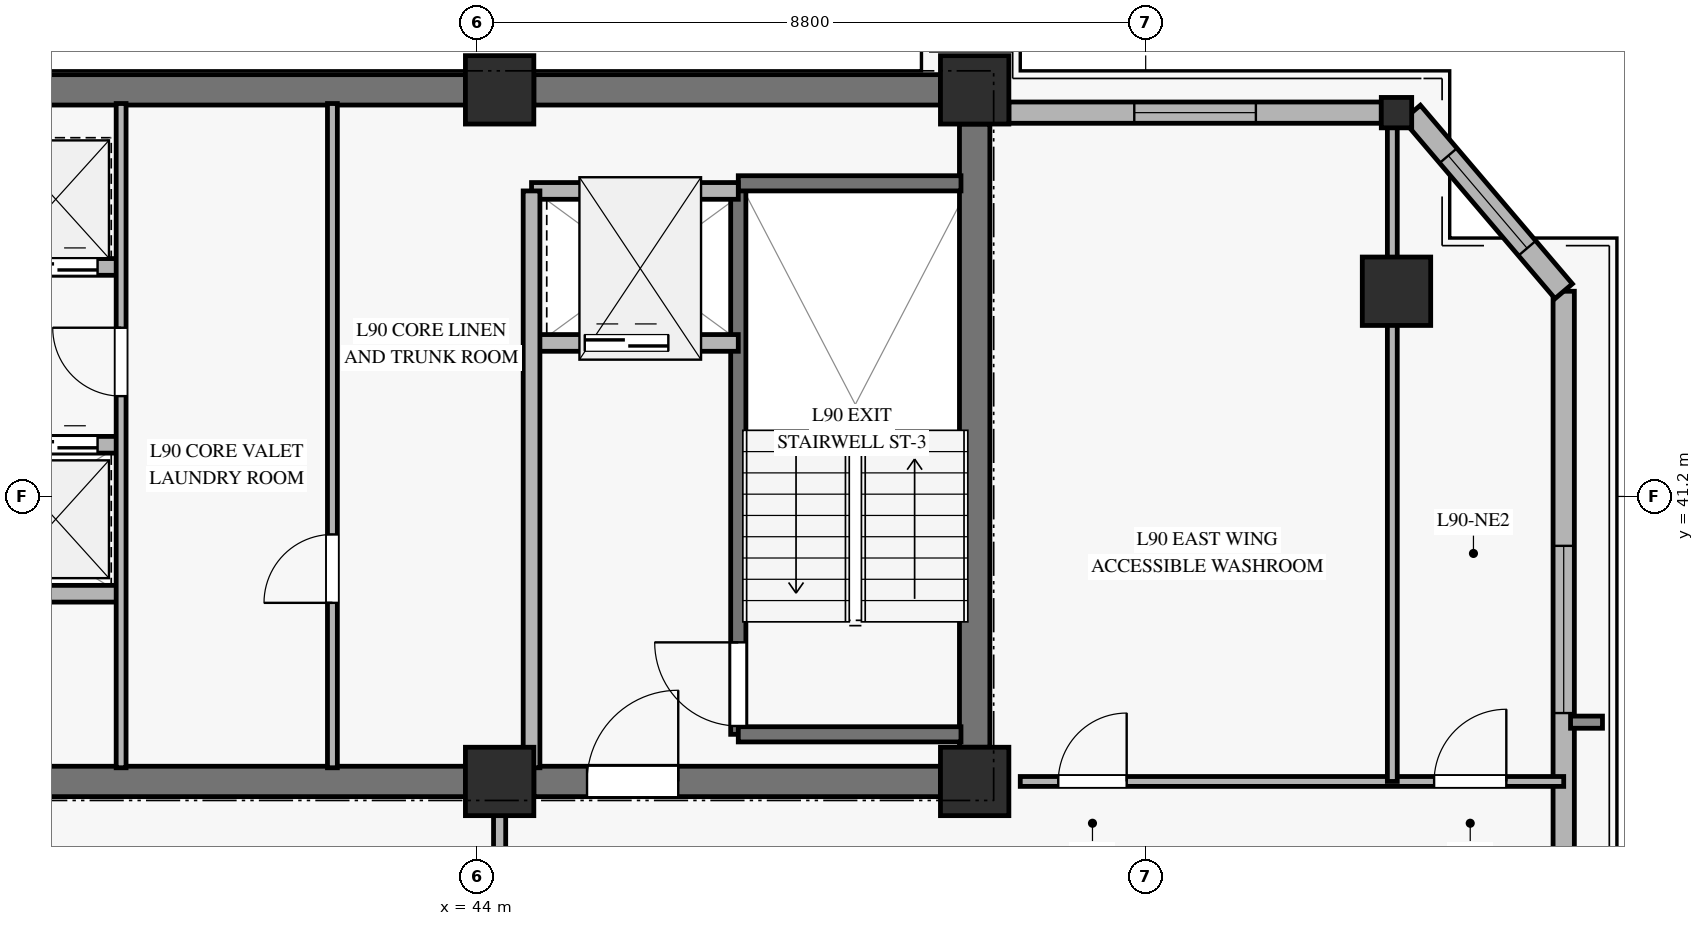
"""IFC4 building model, lengths in metres.
Left out: names, types, materials, properties, quantities, classifications, styles, units other than length and angle.
Written with IfcOpenShell. Run it as: python <this file> out.ifc"""

import sys

from ifc_helpers import new_model, si_unit, direction, frame, frame_2d, origin, origin_2d, place, context, subcontext, project, spatial, rectangle, hollow_rectangle, extrude, source, transform, mapped, element, fill, save


model = new_model("IFC4")
c1 = context("Model", 3, precision=1e-05, world=origin(), true_north=direction((0.0, 1.0)))
c2 = subcontext(c1, "Body", "Model", "MODEL_VIEW")
j1 = project(units=[si_unit("LENGTHUNIT", "METRE"), si_unit("PLANEANGLEUNIT", "RADIAN")], contexts=[c1])
p1 = place(None, origin())
s1 = spatial("IfcSite", under=j1, at=p1, CompositionType="ELEMENT")
p2 = place(p1, origin())
s2 = spatial("IfcBuilding", under=s1, at=p2, CompositionType="ELEMENT")
p3 = place(p2, frame((0.0, 0.0, 345.9)))
s3 = spatial("IfcBuildingStorey", under=s2, at=p3, CompositionType="ELEMENT", Elevation=345.9)
m1 = source(origin(), c2, "Body", "SweptSolid", [
    extrude(rectangle(XDim=0.9, YDim=0.9, at=origin_2d()), origin(), (0.0, 0.0, 1.0), 3.185),
])
for number, where, z_axis, x_axis in (
    (1, (44.3, 37.45, 0.0), (0.0, 0.0, 1.0), (1.0, 0.0, 0.0)),
    (2, (44.3, 46.55, 0.0), (0.0, 0.0, 1.0), (1.0, 0.0, 0.0)),
    (3, (50.55, 37.45, 0.0), (0.0, 0.0, 1.0), (1.0, 0.0, 0.0)),
    (4, (50.55, 46.55, 0.0), (0.0, 0.0, 1.0), (1.0, 0.0, 0.0)),
):
    element("IfcColumn", number, at=place(p3, frame(where, z_axis=z_axis, x_axis=x_axis)), inside=s3, PredefinedType="PILASTER", context=c2, shape_type="MappedRepresentation", body=[
        mapped(m1, transform((0.0, 0.0, 0.0), x_axis=(1.0, 0.0, 0.0), y_axis=(0.0, 1.0, 0.0), z_axis=(0.0, 0.0, 1.0), scale=1.0)),
    ])
p4 = place(p3, frame((36.05, 46.55, 0.0), z_axis=(0.0, 0.0, 1.0), x_axis=(1.0, 0.0, 0.0)))
e5 = element("IfcWall", 5, at=p4, inside=s3, PredefinedType="SHEAR", context=c2, shape_type="SweptSolid", body=[
    extrude(rectangle(XDim=7.8, YDim=0.4, at=frame_2d((3.9, 0.0))), origin(), (0.0, 0.0, 1.0), 3.185),
])
p5 = place(p3, frame((44.75, 46.55, 0.0), z_axis=(0.0, 0.0, 1.0), x_axis=(1.0, 0.0, 0.0)))
e6 = element("IfcWall", 6, at=p5, inside=s3, PredefinedType="SHEAR", context=c2, shape_type="SweptSolid", body=[
    extrude(rectangle(XDim=5.35, YDim=0.4, at=frame_2d((2.675, 0.0))), origin(), (0.0, 0.0, 1.0), 3.185),
])
p6 = place(p3, frame((36.05, 37.45, 0.0), z_axis=(0.0, 0.0, 1.0), x_axis=(1.0, 0.0, 0.0)))
e7 = element("IfcWall", 7, at=p6, inside=s3, PredefinedType="SHEAR", context=c2, shape_type="SweptSolid", body=[
    extrude(rectangle(XDim=7.8, YDim=0.4, at=frame_2d((3.9, 0.0))), origin(), (0.0, 0.0, 1.0), 3.185),
])
p7 = place(p3, frame((44.75, 37.45, 0.0), z_axis=(0.0, 0.0, 1.0), x_axis=(1.0, 0.0, 0.0)))
e8 = element("IfcWall", 8, at=p7, inside=s3, PredefinedType="SHEAR", context=c2, shape_type="SweptSolid", body=[
    extrude(rectangle(XDim=5.35, YDim=0.4, at=frame_2d((2.675, 0.0))), origin(), (0.0, 0.0, 1.0), 3.185),
])
p8 = place(p7, frame((0.7, 0.0, 0.0)))
e9 = element("IfcOpeningElement", 9, at=p8, cuts=e8, PredefinedType="OPENING", context=c2, shape_type="SweptSolid", body=[
    extrude(rectangle(XDim=1.2, YDim=2.15, at=frame_2d((0.6, 1.075))), frame((0.0, 0.21, 0.0), z_axis=(0.0, -1.0, 0.0), x_axis=(1.0, 0.0, 0.0)), (0.0, 0.0, 1.0), 0.42),
])
p9 = place(p3, frame((50.55, 37.9, 0.0), z_axis=(0.0, 0.0, 1.0), x_axis=(0.0, 1.0, 0.0)))
e10 = element("IfcWall", 10, at=p9, inside=s3, PredefinedType="SHEAR", context=c2, shape_type="SweptSolid", body=[
    extrude(rectangle(XDim=8.2, YDim=0.4, at=frame_2d((4.1, 0.0))), origin(), (0.0, 0.0, 1.0), 3.185),
])
m2 = source(origin(), c2, "Body", "SweptSolid", [
    extrude(hollow_rectangle(XDim=0.9, YDim=0.9, WallThickness=0.04, at=origin_2d()), origin(), (0.0, 0.0, 1.0), 3.185),
])
p10 = place(p3, frame((56.1, 43.9, 0.0), z_axis=(0.0, 0.0, 1.0), x_axis=(1.0, 0.0, 0.0)))
e11 = element("IfcColumn", 11, at=p10, inside=s3, PredefinedType="COLUMN", context=c2, shape_type="MappedRepresentation", body=[
    mapped(m2, transform((0.0, 0.0, 0.0), x_axis=(1.0, 0.0, 0.0), y_axis=(0.0, 1.0, 0.0), z_axis=(0.0, 0.0, 1.0), scale=1.0)),
])
m3 = source(origin(), c2, "Body", "SweptSolid", [
    extrude(hollow_rectangle(XDim=0.4, YDim=0.4, WallThickness=0.02, at=origin_2d()), origin(), (0.0, 0.0, 1.0), 3.185),
])
p11 = place(p3, frame((56.1, 46.25, 0.0), z_axis=(0.0, 0.0, 1.0), x_axis=(1.0, 0.0, 0.0)))
e12 = element("IfcColumn", 12, at=p11, inside=s3, PredefinedType="COLUMN", context=c2, shape_type="MappedRepresentation", body=[
    mapped(m3, transform((0.0, 0.0, 0.0), x_axis=(1.0, 0.0, 0.0), y_axis=(0.0, 1.0, 0.0), z_axis=(0.0, 0.0, 1.0), scale=1.0)),
])
p12 = place(p3, frame((58.3, 35.0, 0.0), z_axis=(0.0, 0.0, 1.0), x_axis=(0.0, 1.0, 0.0)))
e13 = element("IfcWall", 13, at=p12, inside=s3, PredefinedType="SOLIDWALL", context=c2, shape_type="SweptSolid", body=[
    extrude(rectangle(XDim=8.9, YDim=0.28, at=frame_2d((4.45, 0.0))), origin(), (0.0, 0.0, 1.0), 2.815),
])
p13 = place(p12, frame((3.35, 0.0, 0.45)))
e14 = element("IfcOpeningElement", 14, at=p13, cuts=e13, PredefinedType="OPENING", context=c2, shape_type="SweptSolid", body=[
    extrude(rectangle(XDim=2.2, YDim=2.1, at=frame_2d((1.1, 1.05))), frame((0.0, 0.15, 0.0), z_axis=(0.0, -1.0, 0.0), x_axis=(1.0, 0.0, 0.0)), (0.0, 0.0, 1.0), 0.3),
])
p14 = place(p3, frame((51.0, 46.25, 0.0), z_axis=(0.0, 0.0, 1.0), x_axis=(1.0, 0.0, 0.0)))
e15 = element("IfcWall", 15, at=p14, inside=s3, PredefinedType="SOLIDWALL", context=c2, shape_type="SweptSolid", body=[
    extrude(rectangle(XDim=4.9, YDim=0.28, at=frame_2d((2.45, 0.0))), origin(), (0.0, 0.0, 1.0), 2.815),
])
p15 = place(p14, frame((1.65, 0.0, 0.45)))
e16 = element("IfcOpeningElement", 16, at=p15, cuts=e15, PredefinedType="OPENING", context=c2, shape_type="SweptSolid", body=[
    extrude(rectangle(XDim=1.6, YDim=2.0, at=frame_2d((0.8, 1.0))), frame((0.0, 0.15, 0.0), z_axis=(0.0, -1.0, 0.0), x_axis=(1.0, 0.0, 0.0)), (0.0, 0.0, 1.0), 0.3),
])
p16 = place(p3, frame((58.3, 43.9, 0.0), z_axis=(0.0, 0.0, 1.0), x_axis=(-0.648103010114, 0.761552682538, 0.0)))
e17 = element("IfcWall", 17, at=p16, inside=s3, PredefinedType="SOLIDWALL", context=c2, shape_type="SweptSolid", body=[
    extrude(rectangle(XDim=3.086, YDim=0.3, at=frame_2d((1.543, 0.0))), origin(), (0.0, 0.0, 1.0), 2.815),
])
p17 = place(p16, frame((0.743, 0.0, 0.45)))
e18 = element("IfcOpeningElement", 18, at=p17, cuts=e17, PredefinedType="OPENING", context=c2, shape_type="SweptSolid", body=[
    extrude(rectangle(XDim=1.6, YDim=2.0, at=frame_2d((0.8, 1.0))), frame((0.0, 0.16, 0.0), z_axis=(0.0, -1.0, 0.0), x_axis=(1.0, 0.0, 0.0)), (0.0, 0.0, 1.0), 0.32),
])
p18 = place(p3, frame((47.44, 38.07, 0.0), z_axis=(0.0, 0.0, 1.0), x_axis=(0.0, 1.0, 0.0)))
e19 = element("IfcWall", 19, at=p18, inside=s3, PredefinedType="SOLIDWALL", context=c2, shape_type="SweptSolid", body=[
    extrude(rectangle(XDim=7.25, YDim=0.2, at=frame_2d((3.625, 0.0))), origin(), (0.0, 0.0, 1.0), 3.4),
])
p19 = place(p18, frame((0.11, 0.0, 0.0)))
e20 = element("IfcOpeningElement", 20, at=p19, cuts=e19, PredefinedType="OPENING", context=c2, shape_type="SweptSolid", body=[
    extrude(rectangle(XDim=1.1, YDim=2.15, at=frame_2d((0.55, 1.075))), frame((0.0, 0.11, 0.0), z_axis=(0.0, -1.0, 0.0), x_axis=(1.0, 0.0, 0.0)), (0.0, 0.0, 1.0), 0.22),
])
for number, where, z_axis, x_axis in (
    (21, (47.44, 45.32, 0.0), (0.0, 0.0, 1.0), (1.0, 0.0, 0.0)),
    (22, (47.44, 38.07, 0.0), (0.0, 0.0, 1.0), (1.0, 0.0, 0.0)),
):
    element("IfcWall", number, at=place(p3, frame(where, z_axis=z_axis, x_axis=x_axis)), inside=s3, PredefinedType="SOLIDWALL", context=c2, shape_type="SweptSolid", body=[
        extrude(rectangle(XDim=2.93, YDim=0.2, at=frame_2d((1.465, 0.0))), origin(), (0.0, 0.0, 1.0), 3.4),
    ])
p20 = place(p3, frame((44.72, 43.22, 0.0), z_axis=(0.0, 0.0, 1.0), x_axis=(1.0, 0.0, 0.0)))
e23 = element("IfcWall", 23, at=p20, inside=s3, PredefinedType="SOLIDWALL", context=c2, shape_type="SweptSolid", body=[
    extrude(rectangle(XDim=2.72, YDim=0.22, at=frame_2d((1.36, 0.0))), origin(), (0.0, 0.0, 1.0), 3.185),
])
p21 = place(p20, frame((0.7, 0.0, 0.0)))
e24 = element("IfcOpeningElement", 24, at=p21, cuts=e23, PredefinedType="OPENING", context=c2, shape_type="SweptSolid", body=[
    extrude(rectangle(XDim=1.1, YDim=2.2, at=frame_2d((0.55, 1.1))), frame((0.0, 0.12, 0.0), z_axis=(0.0, -1.0, 0.0), x_axis=(1.0, 0.0, 0.0)), (0.0, 0.0, 1.0), 0.24),
])
p22 = place(p3, frame((44.72, 45.22, 0.0), z_axis=(0.0, 0.0, 1.0), x_axis=(1.0, 0.0, 0.0)))
e25 = element("IfcWall", 25, at=p22, inside=s3, PredefinedType="SOLIDWALL", context=c2, shape_type="SweptSolid", body=[
    extrude(rectangle(XDim=2.72, YDim=0.22, at=frame_2d((1.36, 0.0))), origin(), (0.0, 0.0, 1.0), 3.185),
])
p23 = place(p3, frame((44.72, 37.63, 0.0), z_axis=(0.0, 0.0, 1.0), x_axis=(0.0, 1.0, 0.0)))
e26 = element("IfcWall", 26, at=p23, inside=s3, PredefinedType="SOLIDWALL", context=c2, shape_type="SweptSolid", body=[
    extrude(rectangle(XDim=7.59, YDim=0.22, at=frame_2d((3.795, 0.0))), origin(), (0.0, 0.0, 1.0), 3.185),
])
p24 = place(p3, frame((36.12, 44.22, 0.0), z_axis=(0.0, 0.0, 1.0), x_axis=(1.0, 0.0, 0.0)))
e27 = element("IfcWall", 27, at=p24, inside=s3, PredefinedType="SOLIDWALL", context=c2, shape_type="SweptSolid", body=[
    extrude(rectangle(XDim=3.2, YDim=0.22, at=frame_2d((1.6, 0.0))), origin(), (0.0, 0.0, 1.0), 3.185),
])
p25 = place(p24, frame((0.3, 0.0, 0.0)))
e28 = element("IfcOpeningElement", 28, at=p25, cuts=e27, PredefinedType="OPENING", context=c2, shape_type="SweptSolid", body=[
    extrude(rectangle(XDim=1.1, YDim=2.2, at=frame_2d((0.55, 1.1))), frame((0.0, 0.12, 0.0), z_axis=(0.0, -1.0, 0.0), x_axis=(1.0, 0.0, 0.0)), (0.0, 0.0, 1.0), 0.24),
])
p26 = place(p24, frame((1.79, 0.0, 0.0)))
e29 = element("IfcOpeningElement", 29, at=p26, cuts=e27, PredefinedType="OPENING", context=c2, shape_type="SweptSolid", body=[
    extrude(rectangle(XDim=1.1, YDim=2.2, at=frame_2d((0.55, 1.1))), frame((0.0, 0.12, 0.0), z_axis=(0.0, -1.0, 0.0), x_axis=(1.0, 0.0, 0.0)), (0.0, 0.0, 1.0), 0.24),
])
p27 = place(p3, frame((36.12, 41.88, 0.0), z_axis=(0.0, 0.0, 1.0), x_axis=(1.0, 0.0, 0.0)))
e30 = element("IfcWall", 30, at=p27, inside=s3, PredefinedType="SOLIDWALL", context=c2, shape_type="SweptSolid", body=[
    extrude(rectangle(XDim=3.2, YDim=0.22, at=frame_2d((1.6, 0.0))), origin(), (0.0, 0.0, 1.0), 3.185),
])
p28 = place(p27, frame((0.3, 0.0, 0.0)))
e31 = element("IfcOpeningElement", 31, at=p28, cuts=e30, PredefinedType="OPENING", context=c2, shape_type="SweptSolid", body=[
    extrude(rectangle(XDim=1.1, YDim=2.2, at=frame_2d((0.55, 1.1))), frame((0.0, 0.12, 0.0), z_axis=(0.0, -1.0, 0.0), x_axis=(1.0, 0.0, 0.0)), (0.0, 0.0, 1.0), 0.24),
])
p29 = place(p27, frame((1.79, 0.0, 0.0)))
e32 = element("IfcOpeningElement", 32, at=p29, cuts=e30, PredefinedType="OPENING", context=c2, shape_type="SweptSolid", body=[
    extrude(rectangle(XDim=1.1, YDim=2.2, at=frame_2d((0.55, 1.1))), frame((0.0, 0.12, 0.0), z_axis=(0.0, -1.0, 0.0), x_axis=(1.0, 0.0, 0.0)), (0.0, 0.0, 1.0), 0.24),
])
p30 = place(p3, frame((36.12, 39.92, 0.0), z_axis=(0.0, 0.0, 1.0), x_axis=(1.0, 0.0, 0.0)))
e33 = element("IfcWall", 33, at=p30, inside=s3, PredefinedType="SOLIDWALL", context=c2, shape_type="SweptSolid", body=[
    extrude(rectangle(XDim=3.2, YDim=0.22, at=frame_2d((1.6, 0.0))), origin(), (0.0, 0.0, 1.0), 3.185),
])
p31 = place(p3, frame((39.32, 37.63, 0.0), z_axis=(0.0, 0.0, 1.0), x_axis=(0.0, 1.0, 0.0)))
e34 = element("IfcWall", 34, at=p31, inside=s3, PredefinedType="PARTITIONING", context=c2, shape_type="SweptSolid", body=[
    extrude(rectangle(XDim=8.74, YDim=0.13, at=frame_2d((4.37, 0.0))), origin(), (0.0, 0.0, 1.0), 3.185),
])
p32 = place(p31, frame((4.89, 0.0, 0.0)))
e35 = element("IfcOpeningElement", 35, at=p32, cuts=e34, PredefinedType="OPENING", context=c2, shape_type="SweptSolid", body=[
    extrude(rectangle(XDim=0.9, YDim=2.1, at=frame_2d((0.45, 1.05))), frame((0.0, 0.075, 0.0), z_axis=(0.0, -1.0, 0.0), x_axis=(1.0, 0.0, 0.0)), (0.0, 0.0, 1.0), 0.15),
])
p33 = place(p3, frame((42.1, 37.63, 0.0), z_axis=(0.0, 0.0, 1.0), x_axis=(0.0, 1.0, 0.0)))
e36 = element("IfcWall", 36, at=p33, inside=s3, PredefinedType="PARTITIONING", context=c2, shape_type="SweptSolid", body=[
    extrude(rectangle(XDim=8.74, YDim=0.13, at=frame_2d((4.37, 0.0))), origin(), (0.0, 0.0, 1.0), 3.185),
])
p34 = place(p33, frame((2.17, 0.0, 0.0)))
e37 = element("IfcOpeningElement", 37, at=p34, cuts=e36, PredefinedType="OPENING", context=c2, shape_type="SweptSolid", body=[
    extrude(rectangle(XDim=0.9, YDim=2.1, at=frame_2d((0.45, 1.05))), frame((0.0, 0.075, 0.0), z_axis=(0.0, -1.0, 0.0), x_axis=(1.0, 0.0, 0.0)), (0.0, 0.0, 1.0), 0.15),
])
p35 = place(p3, frame((44.3, 23.5, 0.0), z_axis=(0.0, 0.0, 1.0), x_axis=(0.0, 1.0, 0.0)))
e38 = element("IfcWall", 38, at=p35, inside=s3, PredefinedType="PARTITIONING", context=c2, shape_type="SweptSolid", body=[
    extrude(rectangle(XDim=13.95, YDim=0.16, at=frame_2d((6.975, 0.0))), origin(), (0.0, 0.0, 1.0), 2.47),
])
p36 = place(p35, frame((11.42, 0.0, 0.0)))
e39 = element("IfcOpeningElement", 39, at=p36, cuts=e38, PredefinedType="OPENING", context=c2, shape_type="SweptSolid", body=[
    extrude(rectangle(XDim=1.05, YDim=2.15, at=frame_2d((0.525, 1.075))), frame((0.0, 0.09, 0.0), z_axis=(0.0, -1.0, 0.0), x_axis=(1.0, 0.0, 0.0)), (0.0, 0.0, 1.0), 0.18),
])
p37 = place(p3, frame((51.15, 37.45, 0.0), z_axis=(0.0, 0.0, 1.0), x_axis=(1.0, 0.0, 0.0)))
e40 = element("IfcWall", 40, at=p37, inside=s3, PredefinedType="PARTITIONING", context=c2, shape_type="SweptSolid", body=[
    extrude(rectangle(XDim=7.15, YDim=0.13, at=frame_2d((3.575, 0.0))), origin(), (0.0, 0.0, 1.0), 2.82),
])
p38 = place(p37, frame((0.5, 0.0, 0.0)))
e41 = element("IfcOpeningElement", 41, at=p38, cuts=e40, PredefinedType="OPENING", context=c2, shape_type="SweptSolid", body=[
    extrude(rectangle(XDim=0.9, YDim=2.1, at=frame_2d((0.45, 1.05))), frame((0.0, 0.075, 0.0), z_axis=(0.0, -1.0, 0.0), x_axis=(1.0, 0.0, 0.0)), (0.0, 0.0, 1.0), 0.15),
])
p39 = place(p37, frame((5.445, 0.0, 0.0)))
e42 = element("IfcOpeningElement", 42, at=p39, cuts=e40, PredefinedType="OPENING", context=c2, shape_type="SweptSolid", body=[
    extrude(rectangle(XDim=0.95, YDim=2.1, at=frame_2d((0.475, 1.05))), frame((0.0, 0.075, 0.0), z_axis=(0.0, -1.0, 0.0), x_axis=(1.0, 0.0, 0.0)), (0.0, 0.0, 1.0), 0.15),
])
p40 = place(p3, frame((56.045, 37.45, 0.0), z_axis=(0.0, 0.0, 1.0), x_axis=(0.0, 1.0, 0.0)))
e43 = element("IfcWall", 43, at=p40, inside=s3, PredefinedType="PARTITIONING", context=c2, shape_type="SweptSolid", body=[
    extrude(rectangle(XDim=8.8, YDim=0.13, at=frame_2d((4.4, 0.0))), origin(), (0.0, 0.0, 1.0), 2.82),
])
m4 = source(origin(), c2, "Body", "SweptSolid", [
    extrude(rectangle(XDim=2.2, YDim=2.1, at=frame_2d((1.1, 1.05))), frame((0.0, 0.03, 0.0), z_axis=(0.0, -1.0, 0.0), x_axis=(1.0, 0.0, 0.0)), (0.0, 0.0, 1.0), 0.06),
])
p41 = place(p13, origin())
e44 = element("IfcWindow", 44, at=p41, inside=s3, PartitioningType="SINGLE_PANEL", PredefinedType="WINDOW", context=c2, shape_type="MappedRepresentation", body=[
    mapped(m4, transform((0.0, 0.0, 0.0), x_axis=(1.0, 0.0, 0.0), y_axis=(0.0, 1.0, 0.0), z_axis=(0.0, 0.0, 1.0), scale=1.0)),
])
fill(e14, e44)
m5 = source(origin(), c2, "Body", "SweptSolid", [
    extrude(rectangle(XDim=1.6, YDim=2.0, at=frame_2d((0.8, 1.0))), frame((0.0, 0.03, 0.0), z_axis=(0.0, -1.0, 0.0), x_axis=(1.0, 0.0, 0.0)), (0.0, 0.0, 1.0), 0.06),
])
p42 = place(p15, origin())
e45 = element("IfcWindow", 45, at=p42, inside=s3, PartitioningType="SINGLE_PANEL", PredefinedType="WINDOW", context=c2, shape_type="MappedRepresentation", body=[
    mapped(m5, transform((0.0, 0.0, 0.0), x_axis=(1.0, 0.0, 0.0), y_axis=(0.0, 1.0, 0.0), z_axis=(0.0, 0.0, 1.0), scale=1.0)),
])
fill(e16, e45)
p43 = place(p17, origin())
e46 = element("IfcWindow", 46, at=p43, inside=s3, PartitioningType="SINGLE_PANEL", PredefinedType="WINDOW", context=c2, shape_type="MappedRepresentation", body=[
    mapped(m5, transform((0.0, 0.0, 0.0), x_axis=(1.0, 0.0, 0.0), y_axis=(0.0, 1.0, 0.0), z_axis=(0.0, 0.0, 1.0), scale=1.0)),
])
fill(e18, e46)
m6 = source(origin(), c2, "Body", "SweptSolid", [
    extrude(rectangle(XDim=1.1, YDim=2.15, at=frame_2d((0.55, 1.075))), frame((0.0, 0.025, 0.0), z_axis=(0.0, -1.0, 0.0), x_axis=(1.0, 0.0, 0.0)), (0.0, 0.0, 1.0), 0.05),
])
p44 = place(p19, origin())
e47 = element("IfcDoor", 47, at=p44, inside=s3, OperationType="SINGLE_SWING_RIGHT", PredefinedType="DOOR", context=c2, shape_type="MappedRepresentation", body=[
    mapped(m6, transform((0.0, 0.0, 0.0), x_axis=(1.0, 0.0, 0.0), y_axis=(0.0, 1.0, 0.0), z_axis=(0.0, 0.0, 1.0), scale=1.0)),
])
fill(e20, e47)
m7 = source(origin(), c2, "Body", "SweptSolid", [
    extrude(rectangle(XDim=1.1, YDim=2.2, at=frame_2d((0.55, 1.1))), frame((0.0, 0.025, 0.0), z_axis=(0.0, -1.0, 0.0), x_axis=(1.0, 0.0, 0.0)), (0.0, 0.0, 1.0), 0.05),
])
p45 = place(p21, origin())
e48 = element("IfcDoor", 48, at=p45, inside=s3, OperationType="SLIDING_TO_LEFT", PredefinedType="DOOR", context=c2, shape_type="MappedRepresentation", body=[
    mapped(m7, transform((0.0, 0.0, 0.0), x_axis=(1.0, 0.0, 0.0), y_axis=(0.0, 1.0, 0.0), z_axis=(0.0, 0.0, 1.0), scale=1.0)),
])
fill(e24, e48)
m8 = source(origin(), c2, "Body", "SweptSolid", [
    extrude(rectangle(XDim=1.2, YDim=2.15, at=frame_2d((0.6, 1.075))), frame((0.0, 0.025, 0.0), z_axis=(0.0, -1.0, 0.0), x_axis=(1.0, 0.0, 0.0)), (0.0, 0.0, 1.0), 0.05),
])
p46 = place(p8, origin())
e49 = element("IfcDoor", 49, at=p46, inside=s3, OperationType="SINGLE_SWING_RIGHT", PredefinedType="DOOR", context=c2, shape_type="MappedRepresentation", body=[
    mapped(m8, transform((0.0, 0.0, 0.0), x_axis=(1.0, 0.0, 0.0), y_axis=(0.0, 1.0, 0.0), z_axis=(0.0, 0.0, 1.0), scale=1.0)),
])
fill(e9, e49)
p47 = place(p26, origin())
e50 = element("IfcDoor", 50, at=p47, inside=s3, OperationType="SLIDING_TO_LEFT", PredefinedType="DOOR", context=c2, shape_type="MappedRepresentation", body=[
    mapped(m7, transform((0.0, 0.0, 0.0), x_axis=(1.0, 0.0, 0.0), y_axis=(0.0, 1.0, 0.0), z_axis=(0.0, 0.0, 1.0), scale=1.0)),
])
fill(e29, e50)
p48 = place(p29, origin())
e51 = element("IfcDoor", 51, at=p48, inside=s3, OperationType="SLIDING_TO_LEFT", PredefinedType="DOOR", context=c2, shape_type="MappedRepresentation", body=[
    mapped(m7, transform((0.0, 0.0, 0.0), x_axis=(1.0, 0.0, 0.0), y_axis=(0.0, 1.0, 0.0), z_axis=(0.0, 0.0, 1.0), scale=1.0)),
])
fill(e32, e51)
m9 = source(origin(), c2, "Body", "SweptSolid", [
    extrude(rectangle(XDim=0.9, YDim=2.1, at=frame_2d((0.45, 1.05))), frame((0.0, 0.025, 0.0), z_axis=(0.0, -1.0, 0.0), x_axis=(1.0, 0.0, 0.0)), (0.0, 0.0, 1.0), 0.05),
])
p49 = place(p32, origin())
e52 = element("IfcDoor", 52, at=p49, inside=s3, OperationType="SINGLE_SWING_RIGHT", PredefinedType="DOOR", context=c2, shape_type="MappedRepresentation", body=[
    mapped(m9, transform((0.0, 0.0, 0.0), x_axis=(1.0, 0.0, 0.0), y_axis=(0.0, 1.0, 0.0), z_axis=(0.0, 0.0, 1.0), scale=1.0)),
])
fill(e35, e52)
p50 = place(p34, origin())
e53 = element("IfcDoor", 53, at=p50, inside=s3, OperationType="SINGLE_SWING_LEFT", PredefinedType="DOOR", context=c2, shape_type="MappedRepresentation", body=[
    mapped(m9, transform((0.0, 0.0, 0.0), x_axis=(1.0, 0.0, 0.0), y_axis=(0.0, 1.0, 0.0), z_axis=(0.0, 0.0, 1.0), scale=1.0)),
])
fill(e37, e53)
p51 = place(p38, origin())
e54 = element("IfcDoor", 54, at=p51, inside=s3, OperationType="SINGLE_SWING_RIGHT", PredefinedType="DOOR", context=c2, shape_type="MappedRepresentation", body=[
    mapped(m9, transform((0.0, 0.0, 0.0), x_axis=(1.0, 0.0, 0.0), y_axis=(0.0, 1.0, 0.0), z_axis=(0.0, 0.0, 1.0), scale=1.0)),
])
fill(e41, e54)
m10 = source(origin(), c2, "Body", "SweptSolid", [
    extrude(rectangle(XDim=0.95, YDim=2.1, at=frame_2d((0.475, 1.05))), frame((0.0, 0.025, 0.0), z_axis=(0.0, -1.0, 0.0), x_axis=(1.0, 0.0, 0.0)), (0.0, 0.0, 1.0), 0.05),
])
p52 = place(p39, origin())
e55 = element("IfcDoor", 55, at=p52, inside=s3, OperationType="SINGLE_SWING_RIGHT", PredefinedType="DOOR", context=c2, shape_type="MappedRepresentation", body=[
    mapped(m10, transform((0.0, 0.0, 0.0), x_axis=(1.0, 0.0, 0.0), y_axis=(0.0, 1.0, 0.0), z_axis=(0.0, 0.0, 1.0), scale=1.0)),
])
fill(e42, e55)
save(model, sys.argv[1])
